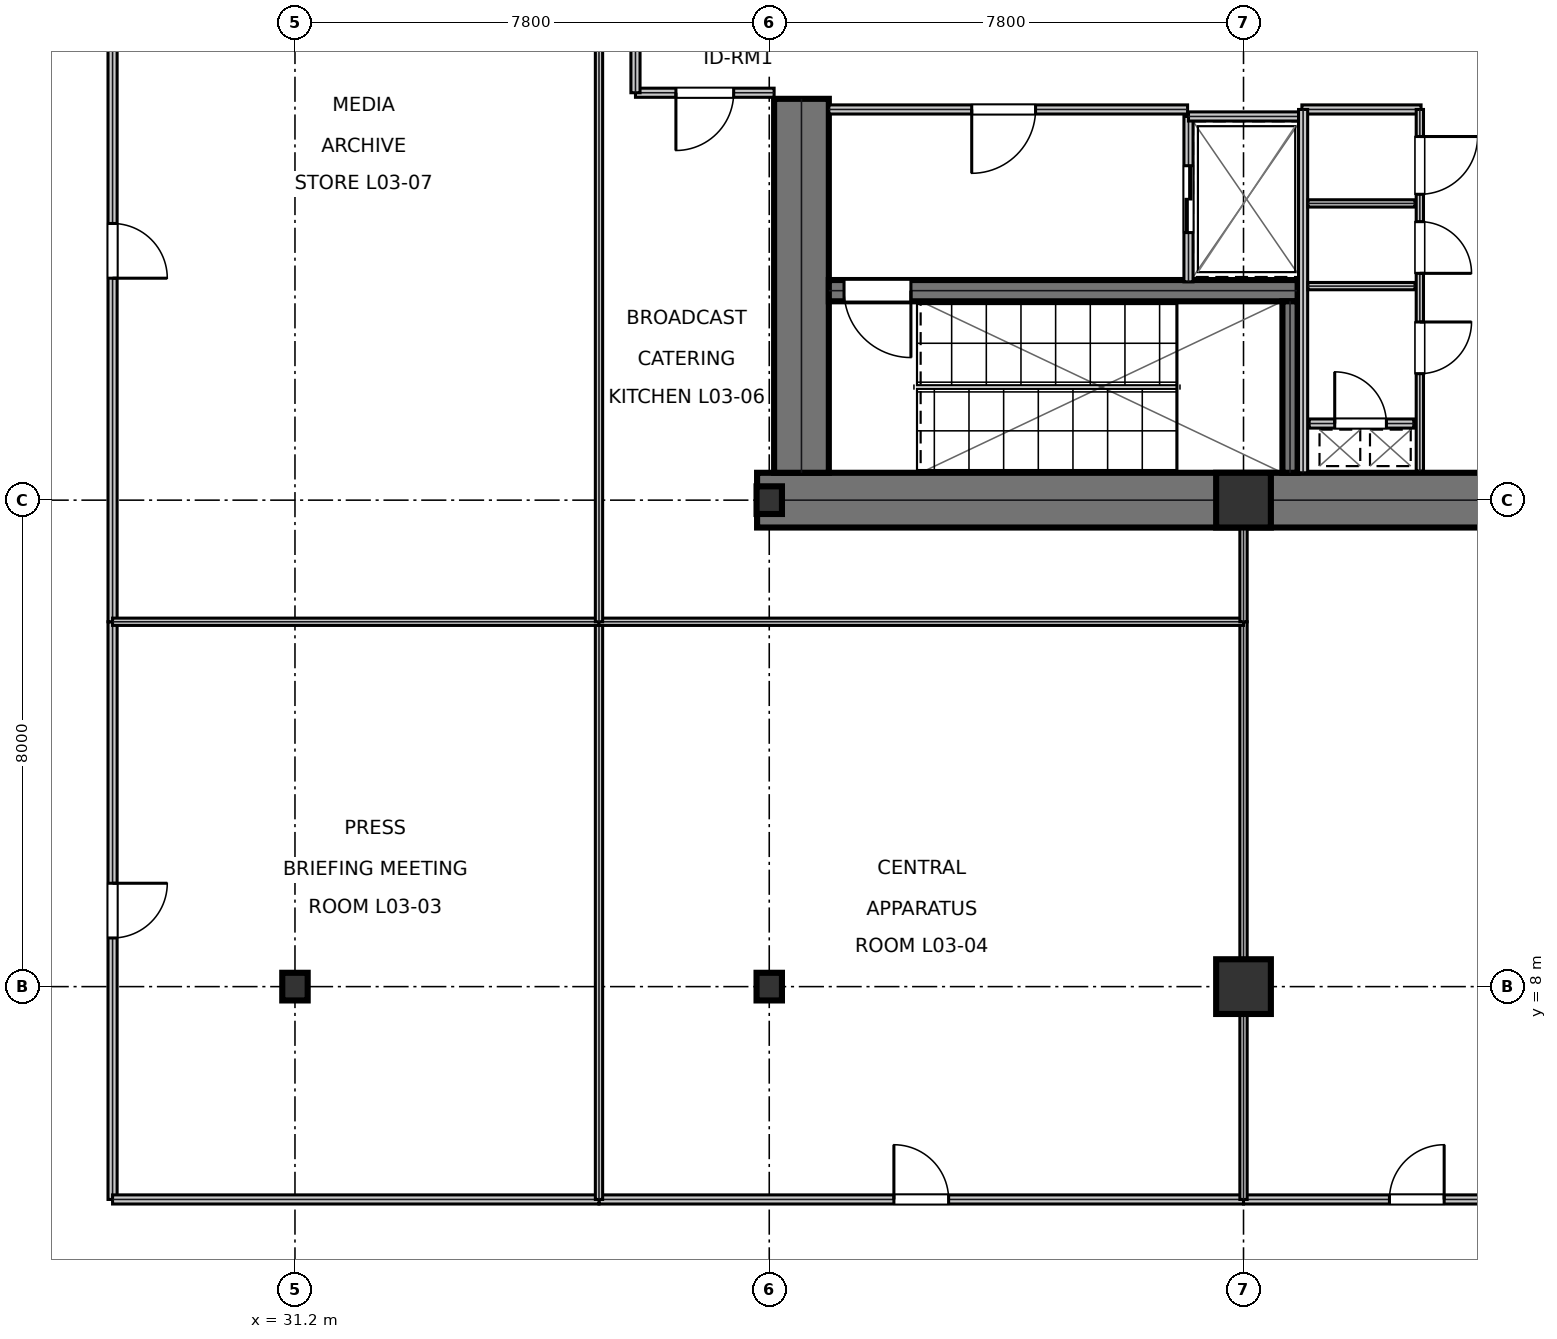
"""IFC4 building model, lengths in metres.
Left out: names, types, materials, properties, quantities, classifications, styles, units other than length and angle.
Written with IfcOpenShell. Run it as: python <this file> out.ifc"""

import sys

from ifc_helpers import new_model, si_unit, direction, frame, frame_2d, origin, origin_2d, place, context, subcontext, project, spatial, rectangle, i_section, extrude, element, fill, save


model = new_model("IFC4")
c1 = context("Model", 3, precision=1e-05, world=origin(), true_north=direction((0.0, 1.0)))
c2 = subcontext(c1, "Body", "Model", "MODEL_VIEW")
j1 = project(units=[si_unit("LENGTHUNIT", "METRE"), si_unit("PLANEANGLEUNIT", "RADIAN")], contexts=[c1])
p1 = place(None, origin())
s1 = spatial("IfcSite", under=j1, at=p1, CompositionType="ELEMENT")
p2 = place(p1, origin())
s2 = spatial("IfcBuilding", under=s1, at=p2, CompositionType="ELEMENT")
p3 = place(p2, frame((0.0, 0.0, 16.2)))
s3 = spatial("IfcBuildingStorey", under=s2, at=p3, CompositionType="ELEMENT", Elevation=16.2)
p4 = place(p3, frame((38.8, 16.0, 0.0), z_axis=(0.0, 0.0, 1.0), x_axis=(1.0, 0.0, 0.0)))
e1 = element("IfcWall", 1, at=p4, inside=s3, PredefinedType="SHEAR", context=c2, shape_type="SweptSolid", body=[
    extrude(rectangle(XDim=16.0, YDim=0.9, at=frame_2d((8.0, 0.0))), origin(), (0.0, 0.0, 1.0), 5.12),
])
p5 = place(p3, frame((39.53, 16.45, 0.0), z_axis=(0.0, 0.0, 1.0), x_axis=(0.0, 1.0, 0.0)))
e2 = element("IfcWall", 2, at=p5, inside=s3, PredefinedType="SHEAR", context=c2, shape_type="SweptSolid", body=[
    extrude(rectangle(XDim=6.15, YDim=0.9, at=frame_2d((3.075, 0.0))), origin(), (0.0, 0.0, 1.0), 5.12),
])
p6 = place(p3, frame((39.98, 19.445, 0.0), z_axis=(0.0, 0.0, 1.0), x_axis=(1.0, 0.0, 0.0)))
e3 = element("IfcWall", 3, at=p6, inside=s3, PredefinedType="SHEAR", context=c2, shape_type="SweptSolid", body=[
    extrude(rectangle(XDim=7.71, YDim=0.35, at=frame_2d((3.855, 0.0))), origin(), (0.0, 0.0, 1.0), 5.12),
])
p7 = place(p6, frame((0.25, 0.0, 0.0)))
e4 = element("IfcOpeningElement", 4, at=p7, cuts=e3, PredefinedType="OPENING", context=c2, shape_type="SweptSolid", body=[
    extrude(rectangle(XDim=1.1, YDim=2.15, at=frame_2d((0.55, 1.075))), frame((0.0, 0.185, 0.0), z_axis=(0.0, -1.0, 0.0), x_axis=(1.0, 0.0, 0.0)), (0.0, 0.0, 1.0), 0.37),
])
p8 = place(p3, frame((47.565, 16.45, 0.0), z_axis=(0.0, 0.0, 1.0), x_axis=(0.0, 1.0, 0.0)))
e5 = element("IfcWall", 5, at=p8, inside=s3, PredefinedType="SHEAR", context=c2, shape_type="SweptSolid", body=[
    extrude(rectangle(XDim=2.82, YDim=0.25, at=frame_2d((1.41, 0.0))), origin(), (0.0, 0.0, 1.0), 5.12),
])
for number, where, z_axis, x_axis in (
    (6, (31.2, 8.0, 0.0), (0.0, 0.0, 1.0), (1.0, 0.0, 0.0)),
    (7, (39.0, 8.0, 0.0), (0.0, 0.0, 1.0), (1.0, 0.0, 0.0)),
    (8, (39.0, 16.0, 0.0), (0.0, 0.0, 1.0), (1.0, 0.0, 0.0)),
):
    element("IfcColumn", number, at=place(p3, frame(where, z_axis=z_axis, x_axis=x_axis)), inside=s3, PredefinedType="COLUMN", context=c2, shape_type="SweptSolid", body=[
        extrude(i_section(OverallWidth=0.418, OverallDepth=0.455, WebThickness=0.042, FlangeThickness=0.068, at=origin_2d()), origin(), (0.0, 0.0, 1.0), 5.395),
    ])
for number, where, z_axis, x_axis in (
    (9, (46.8, 8.0, 0.0), (0.0, 0.0, 1.0), (1.0, 0.0, 0.0)),
    (10, (46.8, 16.0, 0.0), (0.0, 0.0, 1.0), (1.0, 0.0, 0.0)),
):
    element("IfcColumn", number, at=place(p3, frame(where, z_axis=z_axis, x_axis=x_axis)), inside=s3, PredefinedType="COLUMN", context=c2, shape_type="SweptSolid", body=[
        extrude(rectangle(XDim=0.9, YDim=0.9, at=origin_2d()), origin(), (0.0, 0.0, 1.0), 5.395),
    ])
p9 = place(p3, frame((39.98, 22.425, 0.0), z_axis=(0.0, 0.0, 1.0), x_axis=(1.0, 0.0, 0.0)))
e11 = element("IfcWall", 11, at=p9, inside=s3, PredefinedType="PARTITIONING", context=c2, shape_type="SweptSolid", body=[
    extrude(rectangle(XDim=5.9, YDim=0.15, at=frame_2d((2.95, 0.0))), origin(), (0.0, 0.0, 1.0), 5.12),
])
p10 = place(p9, frame((2.35, 0.0, 0.0)))
e12 = element("IfcOpeningElement", 12, at=p10, cuts=e11, PredefinedType="OPENING", context=c2, shape_type="SweptSolid", body=[
    extrude(rectangle(XDim=1.05, YDim=2.15, at=frame_2d((0.525, 1.075))), frame((0.0, 0.085, 0.0), z_axis=(0.0, -1.0, 0.0), x_axis=(1.0, 0.0, 0.0)), (0.0, 0.0, 1.0), 0.17),
])
p11 = place(p3, frame((45.895, 19.59, 0.0), z_axis=(0.0, 0.0, 1.0), x_axis=(0.0, 1.0, 0.0)))
e13 = element("IfcWall", 13, at=p11, inside=s3, PredefinedType="PARTITIONING", context=c2, shape_type="SweptSolid", body=[
    extrude(rectangle(XDim=2.72, YDim=0.15, at=frame_2d((1.36, 0.0))), origin(), (0.0, 0.0, 1.0), 5.12),
])
p12 = place(p11, frame((0.81, 0.0, 0.0)))
e14 = element("IfcOpeningElement", 14, at=p12, cuts=e13, PredefinedType="OPENING", context=c2, shape_type="SweptSolid", body=[
    extrude(rectangle(XDim=1.1, YDim=2.15, at=frame_2d((0.55, 1.075))), frame((0.0, 0.085, 0.0), z_axis=(0.0, -1.0, 0.0), x_axis=(1.0, 0.0, 0.0)), (0.0, 0.0, 1.0), 0.17),
])
p13 = place(p3, frame((45.895, 22.31, 0.0), z_axis=(0.0, 0.0, 1.0), x_axis=(1.0, 0.0, 0.0)))
e15 = element("IfcWall", 15, at=p13, inside=s3, PredefinedType="PARTITIONING", context=c2, shape_type="SweptSolid", body=[
    extrude(rectangle(XDim=1.915, YDim=0.15, at=frame_2d((0.958, 0.0))), origin(), (0.0, 0.0, 1.0), 5.12),
])
p14 = place(p3, frame((47.88, 17.26, 0.0), z_axis=(0.0, 0.0, 1.0), x_axis=(1.0, 0.0, 0.0)))
e16 = element("IfcWall", 16, at=p14, inside=s3, PredefinedType="PARTITIONING", context=c2, shape_type="SweptSolid", body=[
    extrude(rectangle(XDim=1.72, YDim=0.15, at=frame_2d((0.86, 0.0))), origin(), (0.0, 0.0, 1.0), 5.12),
])
p15 = place(p14, frame((0.42, 0.0, 0.0)))
e17 = element("IfcOpeningElement", 17, at=p15, cuts=e16, PredefinedType="OPENING", context=c2, shape_type="SweptSolid", body=[
    extrude(rectangle(XDim=0.85, YDim=2.15, at=frame_2d((0.425, 1.075))), frame((0.0, 0.085, 0.0), z_axis=(0.0, -1.0, 0.0), x_axis=(1.0, 0.0, 0.0)), (0.0, 0.0, 1.0), 0.17),
])
p16 = place(p3, frame((47.76, 22.425, 0.0), z_axis=(0.0, 0.0, 1.0), x_axis=(1.0, 0.0, 0.0)))
e18 = element("IfcWall", 18, at=p16, inside=s3, PredefinedType="PARTITIONING", context=c2, shape_type="SweptSolid", body=[
    extrude(rectangle(XDim=1.96, YDim=0.15, at=frame_2d((0.98, 0.0))), origin(), (0.0, 0.0, 1.0), 5.12),
])
p17 = place(p3, frame((47.78, 16.45, 0.0), z_axis=(0.0, 0.0, 1.0), x_axis=(0.0, 1.0, 0.0)))
e19 = element("IfcWall", 19, at=p17, inside=s3, PredefinedType="PARTITIONING", context=c2, shape_type="SweptSolid", body=[
    extrude(rectangle(XDim=5.975, YDim=0.15, at=frame_2d((2.988, 0.0))), origin(), (0.0, 0.0, 1.0), 5.12),
])
for number, where, z_axis, x_axis in (
    (20, (47.86, 19.52, 0.0), (0.0, 0.0, 1.0), (1.0, 0.0, 0.0)),
    (21, (47.86, 20.88, 0.0), (0.0, 0.0, 1.0), (1.0, 0.0, 0.0)),
):
    element("IfcWall", number, at=place(p3, frame(where, z_axis=z_axis, x_axis=x_axis)), inside=s3, PredefinedType="PARTITIONING", context=c2, shape_type="SweptSolid", body=[
        extrude(rectangle(XDim=1.76, YDim=0.12, at=frame_2d((0.88, 0.0))), origin(), (0.0, 0.0, 1.0), 5.12),
    ])
p18 = place(p3, frame((49.7, 16.48, 0.0), z_axis=(0.0, 0.0, 1.0), x_axis=(0.0, 1.0, 0.0)))
e22 = element("IfcWall", 22, at=p18, inside=s3, PredefinedType="PARTITIONING", context=c2, shape_type="SweptSolid", body=[
    extrude(rectangle(XDim=5.945, YDim=0.12, at=frame_2d((2.973, 0.0))), origin(), (0.0, 0.0, 1.0), 5.12),
])
p19 = place(p18, frame((1.6, 0.0, 0.0)))
e23 = element("IfcOpeningElement", 23, at=p19, cuts=e22, PredefinedType="OPENING", context=c2, shape_type="SweptSolid", body=[
    extrude(rectangle(XDim=0.85, YDim=2.15, at=frame_2d((0.425, 1.075))), frame((0.0, 0.07, 0.0), z_axis=(0.0, -1.0, 0.0), x_axis=(1.0, 0.0, 0.0)), (0.0, 0.0, 1.0), 0.14),
])
p20 = place(p18, frame((3.25, 0.0, 0.0)))
e24 = element("IfcOpeningElement", 24, at=p20, cuts=e22, PredefinedType="OPENING", context=c2, shape_type="SweptSolid", body=[
    extrude(rectangle(XDim=0.85, YDim=2.15, at=frame_2d((0.425, 1.075))), frame((0.0, 0.07, 0.0), z_axis=(0.0, -1.0, 0.0), x_axis=(1.0, 0.0, 0.0)), (0.0, 0.0, 1.0), 0.14),
])
p21 = place(p18, frame((4.55, 0.0, 0.0)))
e25 = element("IfcOpeningElement", 25, at=p21, cuts=e22, PredefinedType="OPENING", context=c2, shape_type="SweptSolid", body=[
    extrude(rectangle(XDim=0.95, YDim=2.15, at=frame_2d((0.475, 1.075))), frame((0.0, 0.07, 0.0), z_axis=(0.0, -1.0, 0.0), x_axis=(1.0, 0.0, 0.0)), (0.0, 0.0, 1.0), 0.14),
])
p22 = place(p3, frame((28.2, 4.5, 0.0), z_axis=(0.0, 0.0, 1.0), x_axis=(0.0, 1.0, 0.0)))
e26 = element("IfcWall", 26, at=p22, inside=s3, PredefinedType="PARTITIONING", context=c2, shape_type="SweptSolid", body=[
    extrude(rectangle(XDim=9.5, YDim=0.15, at=frame_2d((4.75, 0.0))), origin(), (0.0, 0.0, 1.0), 4.338),
])
p23 = place(p22, frame((4.3, 0.0, 0.0)))
e27 = element("IfcOpeningElement", 27, at=p23, cuts=e26, PredefinedType="OPENING", context=c2, shape_type="SweptSolid", body=[
    extrude(rectangle(XDim=0.9, YDim=2.15, at=frame_2d((0.45, 1.075))), frame((0.0, 0.085, 0.0), z_axis=(0.0, -1.0, 0.0), x_axis=(1.0, 0.0, 0.0)), (0.0, 0.0, 1.0), 0.17),
])
p24 = place(p3, frame((36.2, 4.5, 0.0), z_axis=(0.0, 0.0, 1.0), x_axis=(1.0, 0.0, 0.0)))
e28 = element("IfcWall", 28, at=p24, inside=s3, PredefinedType="PARTITIONING", context=c2, shape_type="SweptSolid", body=[
    extrude(rectangle(XDim=10.6, YDim=0.15, at=frame_2d((5.3, 0.0))), origin(), (0.0, 0.0, 1.0), 4.415),
])
p25 = place(p24, frame((4.85, 0.0, 0.0)))
e29 = element("IfcOpeningElement", 29, at=p25, cuts=e28, PredefinedType="OPENING", context=c2, shape_type="SweptSolid", body=[
    extrude(rectangle(XDim=0.9, YDim=2.15, at=frame_2d((0.45, 1.075))), frame((0.0, 0.085, 0.0), z_axis=(0.0, -1.0, 0.0), x_axis=(1.0, 0.0, 0.0)), (0.0, 0.0, 1.0), 0.17),
])
p26 = place(p3, frame((46.8, 4.5, 0.0), z_axis=(0.0, 0.0, 1.0), x_axis=(1.0, 0.0, 0.0)))
e30 = element("IfcWall", 30, at=p26, inside=s3, PredefinedType="PARTITIONING", context=c2, shape_type="SweptSolid", body=[
    extrude(rectangle(XDim=5.7, YDim=0.15, at=frame_2d((2.85, 0.0))), origin(), (0.0, 0.0, 1.0), 4.415),
])
p27 = place(p26, frame((2.4, 0.0, 0.0)))
e31 = element("IfcOpeningElement", 31, at=p27, cuts=e30, PredefinedType="OPENING", context=c2, shape_type="SweptSolid", body=[
    extrude(rectangle(XDim=0.9, YDim=2.15, at=frame_2d((0.45, 1.075))), frame((0.0, 0.085, 0.0), z_axis=(0.0, -1.0, 0.0), x_axis=(1.0, 0.0, 0.0)), (0.0, 0.0, 1.0), 0.17),
])
p28 = place(p3, frame((36.8, 22.7, 0.0), z_axis=(0.0, 0.0, 1.0), x_axis=(1.0, 0.0, 0.0)))
e32 = element("IfcWall", 32, at=p28, inside=s3, PredefinedType="PARTITIONING", context=c2, shape_type="SweptSolid", body=[
    extrude(rectangle(XDim=2.28, YDim=0.15, at=frame_2d((1.14, 0.0))), origin(), (0.0, 0.0, 1.0), 4.415),
])
p29 = place(p28, frame((0.665, 0.0, 0.0)))
e33 = element("IfcOpeningElement", 33, at=p29, cuts=e32, PredefinedType="OPENING", context=c2, shape_type="SweptSolid", body=[
    extrude(rectangle(XDim=0.95, YDim=2.15, at=frame_2d((0.475, 1.075))), frame((0.0, 0.085, 0.0), z_axis=(0.0, -1.0, 0.0), x_axis=(1.0, 0.0, 0.0)), (0.0, 0.0, 1.0), 0.17),
])
p30 = place(p3, frame((28.2, 14.0, 0.0), z_axis=(0.0, 0.0, 1.0), x_axis=(0.0, 1.0, 0.0)))
e34 = element("IfcWall", 34, at=p30, inside=s3, PredefinedType="PARTITIONING", context=c2, shape_type="SweptSolid", body=[
    extrude(rectangle(XDim=12.2, YDim=0.15, at=frame_2d((6.1, 0.0))), origin(), (0.0, 0.0, 1.0), 3.688),
])
p31 = place(p30, frame((5.65, 0.0, 0.0)))
e35 = element("IfcOpeningElement", 35, at=p31, cuts=e34, PredefinedType="OPENING", context=c2, shape_type="SweptSolid", body=[
    extrude(rectangle(XDim=0.9, YDim=2.15, at=frame_2d((0.45, 1.075))), frame((0.0, 0.085, 0.0), z_axis=(0.0, -1.0, 0.0), x_axis=(1.0, 0.0, 0.0)), (0.0, 0.0, 1.0), 0.17),
])
p32 = place(p3, frame((28.2, 4.5, 0.0), z_axis=(0.0, 0.0, 1.0), x_axis=(1.0, 0.0, 0.0)))
e36 = element("IfcWall", 36, at=p32, inside=s3, PredefinedType="PARTITIONING", context=c2, shape_type="SweptSolid", body=[
    extrude(rectangle(XDim=8.0, YDim=0.15, at=frame_2d((4.0, 0.0))), origin(), (0.0, 0.0, 1.0), 4.415),
])
p33 = place(p3, frame((36.8, 22.7, 0.0), z_axis=(0.0, 0.0, 1.0), x_axis=(0.0, 1.0, 0.0)))
e37 = element("IfcWall", 37, at=p33, inside=s3, PredefinedType="PARTITIONING", context=c2, shape_type="SweptSolid", body=[
    extrude(rectangle(XDim=3.5, YDim=0.15, at=frame_2d((1.75, 0.0))), origin(), (0.0, 0.0, 1.0), 4.338),
])
p34 = place(p3, frame((36.2, 4.5, 0.0), z_axis=(0.0, 0.0, 1.0), x_axis=(0.0, 1.0, 0.0)))
e38 = element("IfcWall", 38, at=p34, inside=s3, PredefinedType="PARTITIONING", context=c2, shape_type="SweptSolid", body=[
    extrude(rectangle(XDim=9.5, YDim=0.12, at=frame_2d((4.75, 0.0))), origin(), (0.0, 0.0, 1.0), 4.338),
])
p35 = place(p3, frame((28.2, 14.0, 0.0), z_axis=(0.0, 0.0, 1.0), x_axis=(1.0, 0.0, 0.0)))
e39 = element("IfcWall", 39, at=p35, inside=s3, PredefinedType="PARTITIONING", context=c2, shape_type="SweptSolid", body=[
    extrude(rectangle(XDim=8.0, YDim=0.12, at=frame_2d((4.0, 0.0))), origin(), (0.0, 0.0, 1.0), 3.688),
])
p36 = place(p3, frame((46.8, 4.5, 0.0), z_axis=(0.0, 0.0, 1.0), x_axis=(0.0, 1.0, 0.0)))
e40 = element("IfcWall", 40, at=p36, inside=s3, PredefinedType="PARTITIONING", context=c2, shape_type="SweptSolid", body=[
    extrude(rectangle(XDim=9.5, YDim=0.12, at=frame_2d((4.75, 0.0))), origin(), (0.0, 0.0, 1.0), 4.338),
])
p37 = place(p3, frame((36.2, 14.0, 0.0), z_axis=(0.0, 0.0, 1.0), x_axis=(1.0, 0.0, 0.0)))
e41 = element("IfcWall", 41, at=p37, inside=s3, PredefinedType="PARTITIONING", context=c2, shape_type="SweptSolid", body=[
    extrude(rectangle(XDim=10.6, YDim=0.12, at=frame_2d((5.3, 0.0))), origin(), (0.0, 0.0, 1.0), 4.415),
])
p38 = place(p3, frame((46.8, 14.0, 0.0), z_axis=(0.0, 0.0, 1.0), x_axis=(0.0, 1.0, 0.0)))
e42 = element("IfcWall", 42, at=p38, inside=s3, PredefinedType="PARTITIONING", context=c2, shape_type="SweptSolid", body=[
    extrude(rectangle(XDim=1.6, YDim=0.12, at=frame_2d((0.8, 0.0))), origin(), (0.0, 0.0, 1.0), 4.415),
])
p39 = place(p3, frame((36.2, 14.0, 0.0), z_axis=(0.0, 0.0, 1.0), x_axis=(0.0, 1.0, 0.0)))
e43 = element("IfcWall", 43, at=p39, inside=s3, PredefinedType="PARTITIONING", context=c2, shape_type="SweptSolid", body=[
    extrude(rectangle(XDim=12.2, YDim=0.12, at=frame_2d((6.1, 0.0))), origin(), (0.0, 0.0, 1.0), 3.688),
])
p40 = place(p10, frame((1.05, 0.0, 0.0), z_axis=(0.0, 0.0, 1.0), x_axis=(-1.0, 0.0, 0.0)))
e44 = element("IfcDoor", 44, at=p40, inside=s3, OperationType="SINGLE_SWING_RIGHT", PredefinedType="DOOR", context=c2, shape_type="SweptSolid", body=[
    extrude(rectangle(XDim=1.05, YDim=2.15, at=frame_2d((0.525, 1.075))), frame((0.0, 0.025, 0.0), z_axis=(0.0, -1.0, 0.0), x_axis=(1.0, 0.0, 0.0)), (0.0, 0.0, 1.0), 0.05),
])
fill(e12, e44)
p41 = place(p12, frame((1.1, 0.0, 0.0), z_axis=(0.0, 0.0, 1.0), x_axis=(-1.0, 0.0, 0.0)))
e45 = element("IfcDoor", 45, at=p41, inside=s3, OperationType="DOUBLE_DOOR_SLIDING", PredefinedType="DOOR", context=c2, shape_type="SweptSolid", body=[
    extrude(rectangle(XDim=1.1, YDim=2.15, at=frame_2d((0.55, 1.075))), frame((0.0, 0.025, 0.0), z_axis=(0.0, -1.0, 0.0), x_axis=(1.0, 0.0, 0.0)), (0.0, 0.0, 1.0), 0.05),
])
fill(e14, e45)
p42 = place(p15, origin())
e46 = element("IfcDoor", 46, at=p42, inside=s3, OperationType="SINGLE_SWING_LEFT", PredefinedType="TRAPDOOR", context=c2, shape_type="SweptSolid", body=[
    extrude(rectangle(XDim=0.85, YDim=2.15, at=frame_2d((0.425, 1.075))), frame((0.0, 0.025, 0.0), z_axis=(0.0, -1.0, 0.0), x_axis=(1.0, 0.0, 0.0)), (0.0, 0.0, 1.0), 0.05),
])
fill(e17, e46)
p43 = place(p19, frame((0.85, 0.0, 0.0), z_axis=(0.0, 0.0, 1.0), x_axis=(-1.0, 0.0, 0.0)))
e47 = element("IfcDoor", 47, at=p43, inside=s3, OperationType="SINGLE_SWING_LEFT", PredefinedType="DOOR", context=c2, shape_type="SweptSolid", body=[
    extrude(rectangle(XDim=0.85, YDim=2.15, at=frame_2d((0.425, 1.075))), frame((0.0, 0.025, 0.0), z_axis=(0.0, -1.0, 0.0), x_axis=(1.0, 0.0, 0.0)), (0.0, 0.0, 1.0), 0.05),
])
fill(e23, e47)
p44 = place(p20, frame((0.85, 0.0, 0.0), z_axis=(0.0, 0.0, 1.0), x_axis=(-1.0, 0.0, 0.0)))
e48 = element("IfcDoor", 48, at=p44, inside=s3, OperationType="SINGLE_SWING_RIGHT", PredefinedType="DOOR", context=c2, shape_type="SweptSolid", body=[
    extrude(rectangle(XDim=0.85, YDim=2.15, at=frame_2d((0.425, 1.075))), frame((0.0, 0.025, 0.0), z_axis=(0.0, -1.0, 0.0), x_axis=(1.0, 0.0, 0.0)), (0.0, 0.0, 1.0), 0.05),
])
fill(e24, e48)
p45 = place(p21, frame((0.95, 0.0, 0.0), z_axis=(0.0, 0.0, 1.0), x_axis=(-1.0, 0.0, 0.0)))
e49 = element("IfcDoor", 49, at=p45, inside=s3, OperationType="SINGLE_SWING_LEFT", PredefinedType="DOOR", context=c2, shape_type="SweptSolid", body=[
    extrude(rectangle(XDim=0.95, YDim=2.15, at=frame_2d((0.475, 1.075))), frame((0.0, 0.025, 0.0), z_axis=(0.0, -1.0, 0.0), x_axis=(1.0, 0.0, 0.0)), (0.0, 0.0, 1.0), 0.05),
])
fill(e25, e49)
p46 = place(p23, frame((0.9, 0.0, 0.0), z_axis=(0.0, 0.0, 1.0), x_axis=(-1.0, 0.0, 0.0)))
e50 = element("IfcDoor", 50, at=p46, inside=s3, OperationType="SINGLE_SWING_LEFT", PredefinedType="DOOR", context=c2, shape_type="SweptSolid", body=[
    extrude(rectangle(XDim=0.9, YDim=2.15, at=frame_2d((0.45, 1.075))), frame((0.0, 0.025, 0.0), z_axis=(0.0, -1.0, 0.0), x_axis=(1.0, 0.0, 0.0)), (0.0, 0.0, 1.0), 0.05),
])
fill(e27, e50)
p47 = place(p25, origin())
e51 = element("IfcDoor", 51, at=p47, inside=s3, OperationType="SINGLE_SWING_LEFT", PredefinedType="DOOR", context=c2, shape_type="SweptSolid", body=[
    extrude(rectangle(XDim=0.9, YDim=2.15, at=frame_2d((0.45, 1.075))), frame((0.0, 0.025, 0.0), z_axis=(0.0, -1.0, 0.0), x_axis=(1.0, 0.0, 0.0)), (0.0, 0.0, 1.0), 0.05),
])
fill(e29, e51)
p48 = place(p27, origin())
e52 = element("IfcDoor", 52, at=p48, inside=s3, OperationType="SINGLE_SWING_RIGHT", PredefinedType="DOOR", context=c2, shape_type="SweptSolid", body=[
    extrude(rectangle(XDim=0.9, YDim=2.15, at=frame_2d((0.45, 1.075))), frame((0.0, 0.025, 0.0), z_axis=(0.0, -1.0, 0.0), x_axis=(1.0, 0.0, 0.0)), (0.0, 0.0, 1.0), 0.05),
])
fill(e31, e52)
p49 = place(p29, frame((0.95, 0.0, 0.0), z_axis=(0.0, 0.0, 1.0), x_axis=(-1.0, 0.0, 0.0)))
e53 = element("IfcDoor", 53, at=p49, inside=s3, OperationType="SINGLE_SWING_RIGHT", PredefinedType="DOOR", context=c2, shape_type="SweptSolid", body=[
    extrude(rectangle(XDim=0.95, YDim=2.15, at=frame_2d((0.475, 1.075))), frame((0.0, 0.025, 0.0), z_axis=(0.0, -1.0, 0.0), x_axis=(1.0, 0.0, 0.0)), (0.0, 0.0, 1.0), 0.05),
])
fill(e33, e53)
p50 = place(p31, frame((0.9, 0.0, 0.0), z_axis=(0.0, 0.0, 1.0), x_axis=(-1.0, 0.0, 0.0)))
e54 = element("IfcDoor", 54, at=p50, inside=s3, OperationType="SINGLE_SWING_RIGHT", PredefinedType="DOOR", context=c2, shape_type="SweptSolid", body=[
    extrude(rectangle(XDim=0.9, YDim=2.15, at=frame_2d((0.45, 1.075))), frame((0.0, 0.025, 0.0), z_axis=(0.0, -1.0, 0.0), x_axis=(1.0, 0.0, 0.0)), (0.0, 0.0, 1.0), 0.05),
])
fill(e35, e54)
p51 = place(p7, frame((1.1, 0.0, 0.0), z_axis=(0.0, 0.0, 1.0), x_axis=(-1.0, 0.0, 0.0)))
e55 = element("IfcDoor", 55, at=p51, inside=s3, OperationType="SINGLE_SWING_LEFT", PredefinedType="DOOR", context=c2, shape_type="SweptSolid", body=[
    extrude(rectangle(XDim=1.1, YDim=2.15, at=frame_2d((0.55, 1.075))), frame((0.0, 0.025, 0.0), z_axis=(0.0, -1.0, 0.0), x_axis=(1.0, 0.0, 0.0)), (0.0, 0.0, 1.0), 0.05),
])
fill(e4, e55)
save(model, sys.argv[1])
